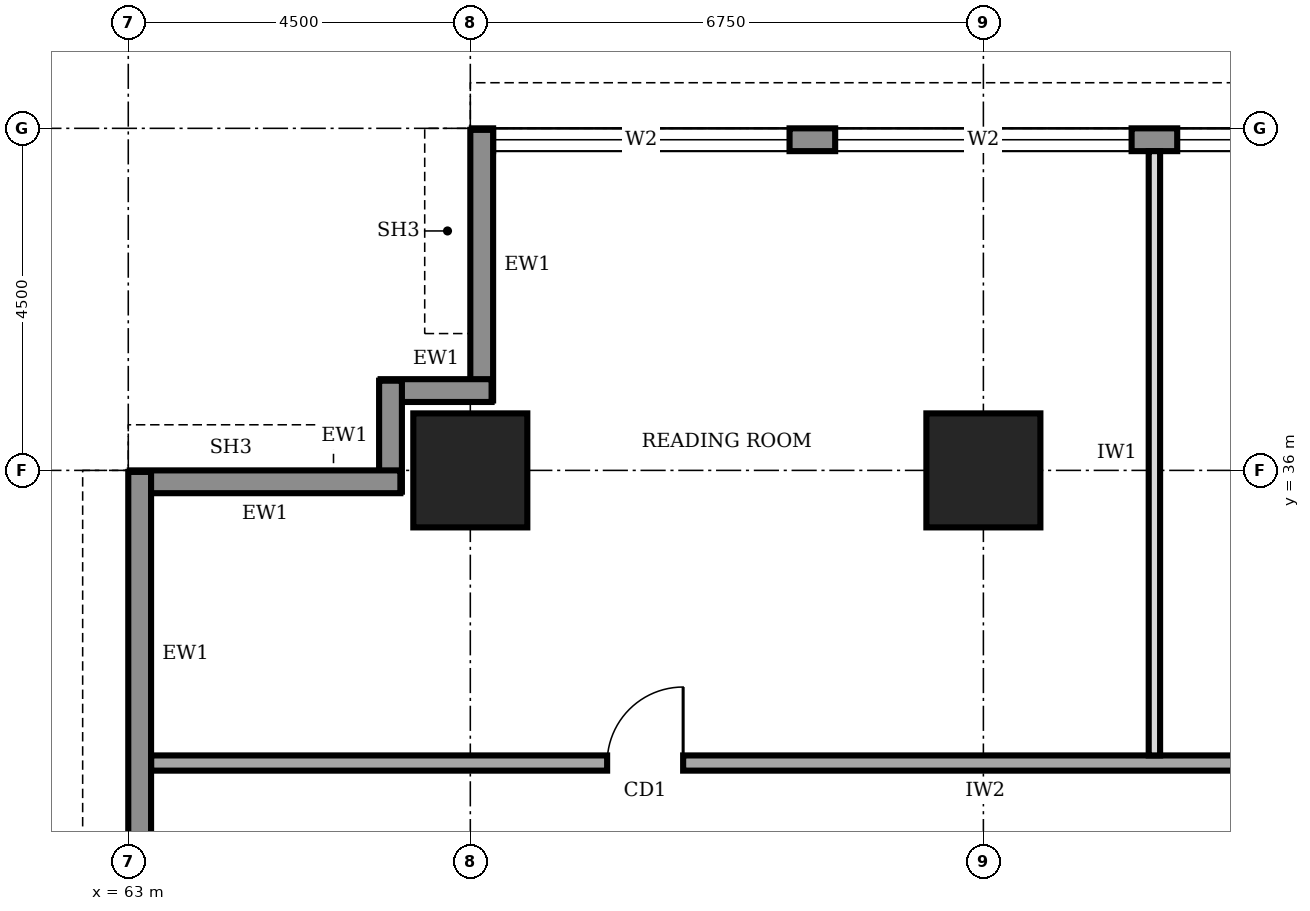
"""IFC4 building model, lengths in metres.
Left out: names, types, materials, properties, quantities, classifications, styles, units other than length and angle.
Written with IfcOpenShell. Run it as: python <this file> out.ifc"""

import sys

from ifc_helpers import new_model, si_unit, direction, frame, frame_2d, origin, origin_2d, place, context, subcontext, project, spatial, rectangle, extrude, element, fill, save


model = new_model("IFC4")
c1 = context("Model", 3, precision=1e-05, world=origin(), true_north=direction((0.0, 1.0)))
c2 = subcontext(c1, "Body", "Model", "MODEL_VIEW")
j1 = project(units=[si_unit("LENGTHUNIT", "METRE"), si_unit("PLANEANGLEUNIT", "RADIAN")], contexts=[c1])
p1 = place(None, origin())
s1 = spatial("IfcSite", under=j1, at=p1, CompositionType="ELEMENT")
p2 = place(p1, origin())
s2 = spatial("IfcBuilding", under=s1, at=p2, CompositionType="ELEMENT")
p3 = place(p2, frame((0.0, 0.0, 161.0)))
s3 = spatial("IfcBuildingStorey", under=s2, at=p3, CompositionType="ELEMENT", Elevation=161.0)
for number, where, z_axis, x_axis in (
    (1, (67.5, 36.0, 0.0), (0.0, 0.0, 1.0), (1.0, 0.0, 0.0)),
    (2, (74.25, 36.0, 0.0), (0.0, 0.0, 1.0), (1.0, 0.0, 0.0)),
):
    element("IfcColumn", number, at=place(p3, frame(where, z_axis=z_axis, x_axis=x_axis)), inside=s3, PredefinedType="COLUMN", context=c2, shape_type="SweptSolid", body=[
        extrude(rectangle(XDim=1.5, YDim=1.5, at=origin_2d()), origin(), (0.0, 0.0, 1.0), 4.0),
    ])
p4 = place(p3, frame((94.48, 40.35, 0.0), z_axis=(0.0, 0.0, 1.0), x_axis=(-1.0, 0.0, 0.0)))
e3 = element("IfcWall", 3, at=p4, inside=s3, PredefinedType="STANDARD", context=c2, shape_type="SweptSolid", body=[
    extrude(rectangle(XDim=26.96, YDim=0.3, at=frame_2d((13.48, 0.0))), origin(), (0.0, 0.0, 1.0), 3.75),
])
p5 = place(p4, frame((22.78, 0.0, 0.6)))
e4 = element("IfcOpeningElement", 4, at=p5, cuts=e3, PredefinedType="OPENING", context=c2, shape_type="SweptSolid", body=[
    extrude(rectangle(XDim=3.9, YDim=2.6, at=frame_2d((1.95, 1.3))), frame((0.0, 0.16, 0.0), z_axis=(0.0, -1.0, 0.0), x_axis=(1.0, 0.0, 0.0)), (0.0, 0.0, 1.0), 0.32),
])
p6 = place(p4, frame((18.28, 0.0, 0.6)))
e5 = element("IfcOpeningElement", 5, at=p6, cuts=e3, PredefinedType="OPENING", context=c2, shape_type="SweptSolid", body=[
    extrude(rectangle(XDim=3.9, YDim=2.6, at=frame_2d((1.95, 1.3))), frame((0.0, 0.16, 0.0), z_axis=(0.0, -1.0, 0.0), x_axis=(1.0, 0.0, 0.0)), (0.0, 0.0, 1.0), 0.32),
])
p7 = place(p4, frame((13.78, 0.0, 0.6)))
e6 = element("IfcOpeningElement", 6, at=p7, cuts=e3, PredefinedType="OPENING", context=c2, shape_type="SweptSolid", body=[
    extrude(rectangle(XDim=3.9, YDim=2.6, at=frame_2d((1.95, 1.3))), frame((0.0, 0.16, 0.0), z_axis=(0.0, -1.0, 0.0), x_axis=(1.0, 0.0, 0.0)), (0.0, 0.0, 1.0), 0.32),
])
p8 = place(p4, frame((9.28, 0.0, 0.6)))
e7 = element("IfcOpeningElement", 7, at=p8, cuts=e3, PredefinedType="OPENING", context=c2, shape_type="SweptSolid", body=[
    extrude(rectangle(XDim=3.9, YDim=2.6, at=frame_2d((1.95, 1.3))), frame((0.0, 0.16, 0.0), z_axis=(0.0, -1.0, 0.0), x_axis=(1.0, 0.0, 0.0)), (0.0, 0.0, 1.0), 0.32),
])
p9 = place(p4, frame((4.78, 0.0, 0.6)))
e8 = element("IfcOpeningElement", 8, at=p9, cuts=e3, PredefinedType="OPENING", context=c2, shape_type="SweptSolid", body=[
    extrude(rectangle(XDim=3.9, YDim=2.6, at=frame_2d((1.95, 1.3))), frame((0.0, 0.16, 0.0), z_axis=(0.0, -1.0, 0.0), x_axis=(1.0, 0.0, 0.0)), (0.0, 0.0, 1.0), 0.32),
])
p10 = place(p3, frame((67.65, 40.48, 0.0), z_axis=(0.0, 0.0, 1.0), x_axis=(0.0, -1.0, 0.0)))
e9 = element("IfcWall", 9, at=p10, inside=s3, PredefinedType="STANDARD", context=c2, shape_type="SweptSolid", body=[
    extrude(rectangle(XDim=3.56, YDim=0.3, at=frame_2d((1.78, 0.0))), origin(), (0.0, 0.0, 1.0), 2.85),
])
for number, where, z_axis, x_axis in (
    (10, (67.78, 37.05, 0.0), (0.0, 0.0, 1.0), (-1.0, 0.0, 0.0)),
    (11, (66.45, 37.18, 0.0), (0.0, 0.0, 1.0), (0.0, -1.0, 0.0)),
):
    element("IfcWall", number, at=place(p3, frame(where, z_axis=z_axis, x_axis=x_axis)), inside=s3, PredefinedType="STANDARD", context=c2, shape_type="SweptSolid", body=[
        extrude(rectangle(XDim=1.46, YDim=0.3, at=frame_2d((0.73, 0.0))), origin(), (0.0, 0.0, 1.0), 3.75),
    ])
p11 = place(p3, frame((66.58, 35.85, 0.0), z_axis=(0.0, 0.0, 1.0), x_axis=(-1.0, 0.0, 0.0)))
e12 = element("IfcWall", 12, at=p11, inside=s3, PredefinedType="STANDARD", context=c2, shape_type="SweptSolid", body=[
    extrude(rectangle(XDim=3.56, YDim=0.3, at=frame_2d((1.78, 0.0))), origin(), (0.0, 0.0, 1.0), 2.85),
])
p12 = place(p3, frame((63.15, 35.98, 0.0), z_axis=(0.0, 0.0, 1.0), x_axis=(0.0, -1.0, 0.0)))
e13 = element("IfcWall", 13, at=p12, inside=s3, PredefinedType="STANDARD", context=c2, shape_type="SweptSolid", body=[
    extrude(rectangle(XDim=31.46, YDim=0.3, at=frame_2d((15.73, 0.0))), origin(), (0.0, 0.0, 1.0), 3.75),
])
p13 = place(p12, frame((27.28, 0.0, 0.6)))
e14 = element("IfcOpeningElement", 14, at=p13, cuts=e13, PredefinedType="OPENING", context=c2, shape_type="SweptSolid", body=[
    extrude(rectangle(XDim=3.9, YDim=2.6, at=frame_2d((1.95, 1.3))), frame((0.0, 0.16, 0.0), z_axis=(0.0, -1.0, 0.0), x_axis=(1.0, 0.0, 0.0)), (0.0, 0.0, 1.0), 0.32),
])
p14 = place(p12, frame((22.78, 0.0, 0.6)))
e15 = element("IfcOpeningElement", 15, at=p14, cuts=e13, PredefinedType="OPENING", context=c2, shape_type="SweptSolid", body=[
    extrude(rectangle(XDim=3.9, YDim=2.6, at=frame_2d((1.95, 1.3))), frame((0.0, 0.16, 0.0), z_axis=(0.0, -1.0, 0.0), x_axis=(1.0, 0.0, 0.0)), (0.0, 0.0, 1.0), 0.32),
])
p15 = place(p12, frame((18.28, 0.0, 0.6)))
e16 = element("IfcOpeningElement", 16, at=p15, cuts=e13, PredefinedType="OPENING", context=c2, shape_type="SweptSolid", body=[
    extrude(rectangle(XDim=3.9, YDim=2.6, at=frame_2d((1.95, 1.3))), frame((0.0, 0.16, 0.0), z_axis=(0.0, -1.0, 0.0), x_axis=(1.0, 0.0, 0.0)), (0.0, 0.0, 1.0), 0.32),
])
p16 = place(p12, frame((13.78, 0.0, 0.6)))
e17 = element("IfcOpeningElement", 17, at=p16, cuts=e13, PredefinedType="OPENING", context=c2, shape_type="SweptSolid", body=[
    extrude(rectangle(XDim=3.9, YDim=2.6, at=frame_2d((1.95, 1.3))), frame((0.0, 0.16, 0.0), z_axis=(0.0, -1.0, 0.0), x_axis=(1.0, 0.0, 0.0)), (0.0, 0.0, 1.0), 0.32),
])
p17 = place(p12, frame((9.28, 0.0, 0.6)))
e18 = element("IfcOpeningElement", 18, at=p17, cuts=e13, PredefinedType="OPENING", context=c2, shape_type="SweptSolid", body=[
    extrude(rectangle(XDim=3.9, YDim=2.6, at=frame_2d((1.95, 1.3))), frame((0.0, 0.16, 0.0), z_axis=(0.0, -1.0, 0.0), x_axis=(1.0, 0.0, 0.0)), (0.0, 0.0, 1.0), 0.32),
])
p18 = place(p12, frame((4.78, 0.0, 0.6)))
e19 = element("IfcOpeningElement", 19, at=p18, cuts=e13, PredefinedType="OPENING", context=c2, shape_type="SweptSolid", body=[
    extrude(rectangle(XDim=3.9, YDim=2.6, at=frame_2d((1.95, 1.3))), frame((0.0, 0.16, 0.0), z_axis=(0.0, -1.0, 0.0), x_axis=(1.0, 0.0, 0.0)), (0.0, 0.0, 1.0), 0.32),
])
p19 = place(p3, frame((89.35, 32.15, 0.0), z_axis=(0.0, 0.0, 1.0), x_axis=(-1.0, 0.0, 0.0)))
e20 = element("IfcWall", 20, at=p19, inside=s3, PredefinedType="SOLIDWALL", context=c2, shape_type="SweptSolid", body=[
    extrude(rectangle(XDim=26.05, YDim=0.2, at=frame_2d((13.025, 0.0))), origin(), (0.0, 0.0, 1.0), 3.75),
])
p20 = place(p19, frame((19.05, 0.0, 0.0)))
e21 = element("IfcOpeningElement", 21, at=p20, cuts=e20, PredefinedType="OPENING", context=c2, shape_type="SweptSolid", body=[
    extrude(rectangle(XDim=1.0, YDim=2.1, at=frame_2d((0.5, 1.05))), frame((0.0, 0.11, 0.0), z_axis=(0.0, -1.0, 0.0), x_axis=(1.0, 0.0, 0.0)), (0.0, 0.0, 1.0), 0.22),
])
p21 = place(p19, frame((10.1, 0.0, 0.0)))
e22 = element("IfcOpeningElement", 22, at=p21, cuts=e20, PredefinedType="OPENING", context=c2, shape_type="SweptSolid", body=[
    extrude(rectangle(XDim=1.0, YDim=2.1, at=frame_2d((0.5, 1.05))), frame((0.0, 0.11, 0.0), z_axis=(0.0, -1.0, 0.0), x_axis=(1.0, 0.0, 0.0)), (0.0, 0.0, 1.0), 0.22),
])
p22 = place(p19, frame((5.6, 0.0, 0.0)))
e23 = element("IfcOpeningElement", 23, at=p22, cuts=e20, PredefinedType="OPENING", context=c2, shape_type="SweptSolid", body=[
    extrude(rectangle(XDim=1.0, YDim=2.1, at=frame_2d((0.5, 1.05))), frame((0.0, 0.11, 0.0), z_axis=(0.0, -1.0, 0.0), x_axis=(1.0, 0.0, 0.0)), (0.0, 0.0, 1.0), 0.22),
])
p23 = place(p19, frame((1.325, 0.0, 0.0)))
e24 = element("IfcOpeningElement", 24, at=p23, cuts=e20, PredefinedType="OPENING", context=c2, shape_type="SweptSolid", body=[
    extrude(rectangle(XDim=1.0, YDim=2.1, at=frame_2d((0.5, 1.05))), frame((0.0, 0.11, 0.0), z_axis=(0.0, -1.0, 0.0), x_axis=(1.0, 0.0, 0.0)), (0.0, 0.0, 1.0), 0.22),
])
p24 = place(p3, frame((76.5, 32.25, 0.0), z_axis=(0.0, 0.0, 1.0), x_axis=(0.0, 1.0, 0.0)))
e25 = element("IfcWall", 25, at=p24, inside=s3, PredefinedType="PARTITIONING", context=c2, shape_type="SweptSolid", body=[
    extrude(rectangle(XDim=7.95, YDim=0.15, at=frame_2d((3.975, 0.0))), origin(), (0.0, 0.0, 1.0), 3.75),
])
p25 = place(p5, origin())
e26 = element("IfcWindow", 26, at=p25, inside=s3, PartitioningType="SINGLE_PANEL", PredefinedType="WINDOW", context=c2, shape_type="SweptSolid", body=[
    extrude(rectangle(XDim=3.9, YDim=2.6, at=frame_2d((1.95, 1.3))), frame((0.0, 0.03, 0.0), z_axis=(0.0, -1.0, 0.0), x_axis=(1.0, 0.0, 0.0)), (0.0, 0.0, 1.0), 0.06),
])
fill(e4, e26)
p26 = place(p6, origin())
e27 = element("IfcWindow", 27, at=p26, inside=s3, PartitioningType="SINGLE_PANEL", PredefinedType="WINDOW", context=c2, shape_type="SweptSolid", body=[
    extrude(rectangle(XDim=3.9, YDim=2.6, at=frame_2d((1.95, 1.3))), frame((0.0, 0.03, 0.0), z_axis=(0.0, -1.0, 0.0), x_axis=(1.0, 0.0, 0.0)), (0.0, 0.0, 1.0), 0.06),
])
fill(e5, e27)
p27 = place(p7, origin())
e28 = element("IfcWindow", 28, at=p27, inside=s3, PartitioningType="SINGLE_PANEL", PredefinedType="WINDOW", context=c2, shape_type="SweptSolid", body=[
    extrude(rectangle(XDim=3.9, YDim=2.6, at=frame_2d((1.95, 1.3))), frame((0.0, 0.03, 0.0), z_axis=(0.0, -1.0, 0.0), x_axis=(1.0, 0.0, 0.0)), (0.0, 0.0, 1.0), 0.06),
])
fill(e6, e28)
p28 = place(p20, frame((1.0, 0.0, 0.0), z_axis=(0.0, 0.0, 1.0), x_axis=(-1.0, 0.0, 0.0)))
e29 = element("IfcDoor", 29, at=p28, inside=s3, OperationType="SINGLE_SWING_RIGHT", PredefinedType="DOOR", context=c2, shape_type="SweptSolid", body=[
    extrude(rectangle(XDim=1.0, YDim=2.1, at=frame_2d((0.5, 1.05))), frame((0.0, 0.025, 0.0), z_axis=(0.0, -1.0, 0.0), x_axis=(1.0, 0.0, 0.0)), (0.0, 0.0, 1.0), 0.05),
])
fill(e21, e29)
save(model, sys.argv[1])
